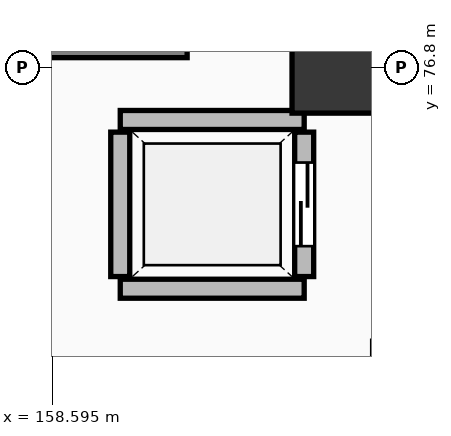
"""IFC4 building model, lengths in metres.
Left out: names, types, materials, properties, quantities, classifications, styles, units other than length and angle.
Written with IfcOpenShell. Run it as: python <this file> out.ifc"""

import sys

from ifc_helpers import new_model, si_unit, direction, frame, frame_2d, origin, origin_2d, place, context, subcontext, project, spatial, rectangle, extrude, element, fill, save


model = new_model("IFC4")
c1 = context("Model", 3, precision=1e-05, world=origin(), true_north=direction((0.0, 1.0)))
c2 = subcontext(c1, "Body", "Model", "MODEL_VIEW")
j1 = project(units=[si_unit("LENGTHUNIT", "METRE"), si_unit("PLANEANGLEUNIT", "RADIAN")], contexts=[c1])
p1 = place(None, origin())
s1 = spatial("IfcSite", under=j1, at=p1, CompositionType="ELEMENT")
p2 = place(p1, origin())
s2 = spatial("IfcBuilding", under=s1, at=p2, CompositionType="ELEMENT")
p3 = place(p2, frame((0.0, 0.0, -8.4)))
s3 = spatial("IfcBuildingStorey", under=s2, at=p3, CompositionType="ELEMENT", Elevation=-8.4)
p4 = place(p3, frame((162.35, 76.8, 0.0), z_axis=(0.0, 0.0, 1.0), x_axis=(1.0, 0.0, 0.0)))
e1 = element("IfcColumn", 1, at=p4, inside=s3, PredefinedType="COLUMN", context=c2, shape_type="SweptSolid", body=[
    extrude(rectangle(XDim=1.2, YDim=1.2, at=origin_2d()), origin(), (0.0, 0.0, 1.0), 4.2),
])
p5 = place(p3, frame((156.7, 77.18, 0.0), z_axis=(0.0, 0.0, 1.0), x_axis=(1.0, 0.0, 0.0)))
e2 = element("IfcWall", 2, at=p5, inside=s3, PredefinedType="SHEAR", context=c2, shape_type="SweptSolid", body=[
    extrude(rectangle(XDim=3.67, YDim=0.5, at=frame_2d((1.835, 0.0))), origin(), (0.0, 0.0, 1.0), 3.86),
])
for number, where, z_axis, x_axis in (
    (3, (159.49, 73.89, 0.0), (0.0, 0.0, 1.0), (1.0, 0.0, 0.0)),
    (4, (159.49, 76.11, 0.0), (0.0, 0.0, 1.0), (1.0, 0.0, 0.0)),
):
    element("IfcWall", number, at=place(p3, frame(where, z_axis=z_axis, x_axis=x_axis)), inside=s3, PredefinedType="SOLIDWALL", context=c2, shape_type="SweptSolid", body=[
        extrude(rectangle(XDim=2.42, YDim=0.25, at=frame_2d((1.21, 0.0))), origin(), (0.0, 0.0, 1.0), 3.86),
    ])
p6 = place(p3, frame((159.49, 74.05, 0.0), z_axis=(0.0, 0.0, 1.0), x_axis=(0.0, 1.0, 0.0)))
e5 = element("IfcWall", 5, at=p6, inside=s3, PredefinedType="SOLIDWALL", context=c2, shape_type="SweptSolid", body=[
    extrude(rectangle(XDim=1.9, YDim=0.25, at=frame_2d((0.95, 0.0))), origin(), (0.0, 0.0, 1.0), 3.86),
])
p7 = place(p3, frame((161.91, 74.05, 0.0), z_axis=(0.0, 0.0, 1.0), x_axis=(0.0, 1.0, 0.0)))
e6 = element("IfcWall", 6, at=p7, inside=s3, PredefinedType="SOLIDWALL", context=c2, shape_type="SweptSolid", body=[
    extrude(rectangle(XDim=1.9, YDim=0.25, at=frame_2d((0.95, 0.0))), origin(), (0.0, 0.0, 1.0), 3.86),
])
p8 = place(p7, frame((0.4, 0.0, 0.0)))
e7 = element("IfcOpeningElement", 7, at=p8, cuts=e6, PredefinedType="OPENING", context=c2, shape_type="SweptSolid", body=[
    extrude(rectangle(XDim=1.1, YDim=2.2, at=frame_2d((0.55, 1.1))), frame((0.0, 0.137, 0.0), z_axis=(0.0, -1.0, 0.0), x_axis=(1.0, 0.0, 0.0)), (0.0, 0.0, 1.0), 0.274),
])
p9 = place(p8, origin())
e8 = element("IfcDoor", 8, at=p9, inside=s3, OperationType="SLIDING_TO_LEFT", PredefinedType="DOOR", context=c2, shape_type="SweptSolid", body=[
    extrude(rectangle(XDim=1.1, YDim=2.2, at=frame_2d((0.55, 1.1))), frame((0.0, 0.025, 0.0), z_axis=(0.0, -1.0, 0.0), x_axis=(1.0, 0.0, 0.0)), (0.0, 0.0, 1.0), 0.05),
])
fill(e7, e8)
save(model, sys.argv[1])
